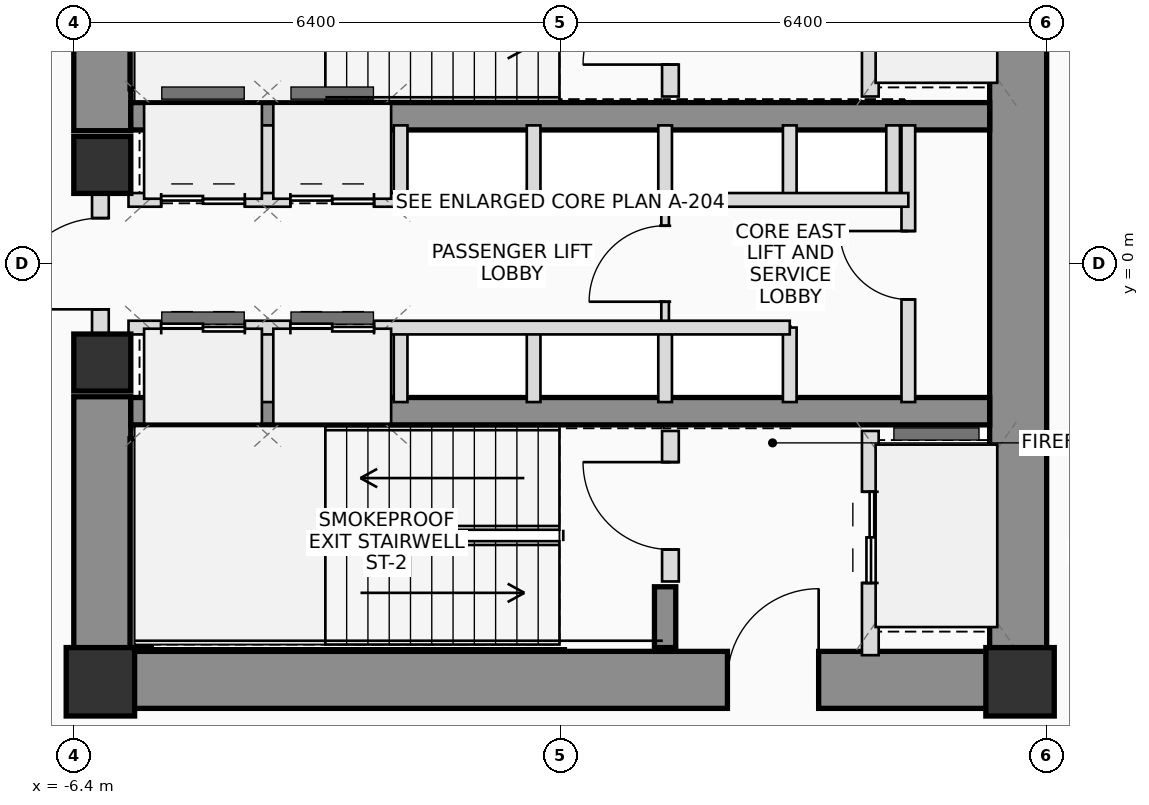
"""IFC4 building model, lengths in metres.
Left out: names, types, materials, properties, quantities, classifications, styles, units other than length and angle.
Written with IfcOpenShell. Run it as: python <this file> out.ifc"""

import sys

from ifc_helpers import new_model, si_unit, direction, frame, frame_2d, origin, origin_2d, place, context, subcontext, project, spatial, rectangle, extrude, source, transform, mapped, element, fill, save


model = new_model("IFC4")
c1 = context("Model", 3, precision=1e-05, world=origin(), true_north=direction((0.0, 1.0)))
c2 = subcontext(c1, "Body", "Model", "MODEL_VIEW")
j1 = project(units=[si_unit("LENGTHUNIT", "METRE"), si_unit("PLANEANGLEUNIT", "RADIAN")], contexts=[c1])
p1 = place(None, origin())
s1 = spatial("IfcSite", under=j1, at=p1, CompositionType="ELEMENT")
p2 = place(p1, origin())
s2 = spatial("IfcBuilding", under=s1, at=p2, CompositionType="ELEMENT")
p3 = place(p2, frame((0.0, 0.0, 38.6)))
s3 = spatial("IfcBuildingStorey", under=s2, at=p3, CompositionType="ELEMENT", Elevation=38.6)
m1 = source(origin(), c2, "Body", "SweptSolid", [
    extrude(rectangle(XDim=0.9, YDim=0.9, at=origin_2d()), origin(), (0.0, 0.0, 1.0), 3.7),
])
for number, where, z_axis, x_axis in (
    (1, (-6.05, -5.5, 0.0), (0.0, 0.0, 1.0), (1.0, 0.0, 0.0)),
    (2, (6.05, -5.5, 0.0), (0.0, 0.0, 1.0), (1.0, 0.0, 0.0)),
):
    element("IfcColumn", number, at=place(p3, frame(where, z_axis=z_axis, x_axis=x_axis)), inside=s3, PredefinedType="COLUMN", context=c2, shape_type="MappedRepresentation", body=[
        mapped(m1, transform((0.0, 0.0, 0.0), scale=1.0)),
    ])
p4 = place(p3, frame((-6.4, -5.475, 0.0), z_axis=(0.0, 0.0, 1.0), x_axis=(1.0, 0.0, 0.0)))
e3 = element("IfcWall", 3, at=p4, inside=s3, PredefinedType="SHEAR", context=c2, shape_type="SweptSolid", body=[
    extrude(rectangle(XDim=12.8, YDim=0.75, at=frame_2d((6.4, 0.0))), origin(), (0.0, 0.0, 1.0), 3.7),
])
p5 = place(p4, frame((8.6, 0.0, 0.0)))
e4 = element("IfcOpeningElement", 4, at=p5, cuts=e3, PredefinedType="OPENING", context=c2, shape_type="SweptSolid", body=[
    extrude(rectangle(XDim=1.2, YDim=2.2, at=frame_2d((0.6, 1.1))), frame((0.0, 0.385, 0.0), z_axis=(0.0, -1.0, 0.0), x_axis=(1.0, 0.0, 0.0)), (0.0, 0.0, 1.0), 0.77),
])
p6 = place(p3, frame((6.025, -5.1, 0.0), z_axis=(0.0, 0.0, 1.0), x_axis=(0.0, 1.0, 0.0)))
e5 = element("IfcWall", 5, at=p6, inside=s3, PredefinedType="SHEAR", context=c2, shape_type="SweptSolid", body=[
    extrude(rectangle(XDim=10.2, YDim=0.75, at=frame_2d((5.1, 0.0))), origin(), (0.0, 0.0, 1.0), 3.7),
])
for number, where, z_axis, x_axis in (
    (6, (-6.025, -5.1, 0.0), (0.0, 0.0, 1.0), (0.0, 1.0, 0.0)),
    (7, (-6.025, 1.75, 0.0), (0.0, 0.0, 1.0), (0.0, 1.0, 0.0)),
):
    element("IfcWall", number, at=place(p3, frame(where, z_axis=z_axis, x_axis=x_axis)), inside=s3, PredefinedType="SHEAR", context=c2, shape_type="SweptSolid", body=[
        extrude(rectangle(XDim=3.35, YDim=0.75, at=frame_2d((1.675, 0.0))), origin(), (0.0, 0.0, 1.0), 3.7),
    ])
for number, where, z_axis, x_axis in (
    (8, (-5.65, 1.94, 0.0), (0.0, 0.0, 1.0), (1.0, 0.0, 0.0)),
    (9, (-5.65, -1.94, 0.0), (0.0, 0.0, 1.0), (1.0, 0.0, 0.0)),
):
    element("IfcWall", number, at=place(p3, frame(where, z_axis=z_axis, x_axis=x_axis)), inside=s3, PredefinedType="SHEAR", context=c2, shape_type="SweptSolid", body=[
        extrude(rectangle(XDim=11.3, YDim=0.36, at=frame_2d((5.65, 0.0))), origin(), (0.0, 0.0, 1.0), 3.7),
    ])
for number, where, z_axis, x_axis in (
    (10, (-5.52, 2.3, 0.0), (0.0, 0.0, 1.0), (0.0, 1.0, 0.0)),
    (11, (-5.52, -5.05, 0.0), (0.0, 0.0, 1.0), (0.0, 1.0, 0.0)),
):
    element("IfcWall", number, at=place(p3, frame(where, z_axis=z_axis, x_axis=x_axis)), inside=s3, PredefinedType="SHEAR", context=c2, shape_type="SweptSolid", body=[
        extrude(rectangle(XDim=2.75, YDim=0.28, at=frame_2d((1.375, 0.0))), origin(), (0.0, 0.0, 1.0), 3.7),
    ])
p7 = place(p3, frame((1.38, -5.05, 0.0), z_axis=(0.0, 0.0, 1.0), x_axis=(0.0, 1.0, 0.0)))
e12 = element("IfcWall", 12, at=p7, inside=s3, PredefinedType="SHEAR", context=c2, shape_type="SweptSolid", body=[
    extrude(rectangle(XDim=0.8, YDim=0.28, at=frame_2d((0.4, 0.0))), origin(), (0.0, 0.0, 1.0), 3.7),
])
m2 = source(origin(), c2, "Body", "SweptSolid", [
    extrude(rectangle(XDim=0.75, YDim=0.75, at=origin_2d()), origin(), (0.0, 0.0, 1.0), 3.7),
])
for number, where, z_axis, x_axis in (
    (13, (-6.025, -1.3, 0.0), (0.0, 0.0, 1.0), (1.0, 0.0, 0.0)),
    (14, (-6.025, 1.3, 0.0), (0.0, 0.0, 1.0), (1.0, 0.0, 0.0)),
):
    element("IfcColumn", number, at=place(p3, frame(where, z_axis=z_axis, x_axis=x_axis)), inside=s3, PredefinedType="COLUMN", context=c2, shape_type="MappedRepresentation", body=[
        mapped(m2, transform((0.0, 0.0, 0.0), scale=1.0)),
    ])
p8 = place(p3, frame((-6.05, -0.95, 0.0), z_axis=(0.0, 0.0, 1.0), x_axis=(0.0, 1.0, 0.0)))
e15 = element("IfcWall", 15, at=p8, inside=s3, PredefinedType="PLUMBINGWALL", context=c2, shape_type="SweptSolid", body=[
    extrude(rectangle(XDim=1.9, YDim=0.22, at=frame_2d((0.95, 0.0))), origin(), (0.0, 0.0, 1.0), 2.475),
])
p9 = place(p8, frame((0.35, 0.0, 0.0)))
e16 = element("IfcOpeningElement", 16, at=p9, cuts=e15, PredefinedType="OPENING", context=c2, shape_type="SweptSolid", body=[
    extrude(rectangle(XDim=1.2, YDim=2.2, at=frame_2d((0.6, 1.1))), frame((0.0, 0.12, 0.0), z_axis=(0.0, -1.0, 0.0), x_axis=(1.0, 0.0, 0.0)), (0.0, 0.0, 1.0), 0.24),
])
p10 = place(p3, frame((1.45, 2.2, 0.0), z_axis=(0.0, 0.0, 1.0), x_axis=(0.0, 1.0, 0.0)))
e17 = element("IfcWall", 17, at=p10, inside=s3, PredefinedType="PLUMBINGWALL", context=c2, shape_type="SweptSolid", body=[
    extrude(rectangle(XDim=1.98, YDim=0.22, at=frame_2d((0.99, 0.0))), origin(), (0.0, 0.0, 1.0), 3.495),
])
p11 = place(p10, frame((0.42, 0.0, 0.0)))
e18 = element("IfcOpeningElement", 18, at=p11, cuts=e17, PredefinedType="OPENING", context=c2, shape_type="SweptSolid", body=[
    extrude(rectangle(XDim=1.15, YDim=2.15, at=frame_2d((0.575, 1.075))), frame((0.0, 0.12, 0.0), z_axis=(0.0, -1.0, 0.0), x_axis=(1.0, 0.0, 0.0)), (0.0, 0.0, 1.0), 0.24),
])
p12 = place(p3, frame((4.08, 2.2, 0.0), z_axis=(0.0, 0.0, 1.0), x_axis=(0.0, 1.0, 0.0)))
e19 = element("IfcWall", 19, at=p12, inside=s3, PredefinedType="PLUMBINGWALL", context=c2, shape_type="SweptSolid", body=[
    extrude(rectangle(XDim=2.95, YDim=0.22, at=frame_2d((1.475, 0.0))), origin(), (0.0, 0.0, 1.0), 3.495),
])
p13 = place(p12, frame((0.75, 0.0, 0.0)))
e20 = element("IfcOpeningElement", 20, at=p13, cuts=e19, PredefinedType="OPENING", context=c2, shape_type="SweptSolid", body=[
    extrude(rectangle(XDim=1.2, YDim=2.25, at=frame_2d((0.6, 1.125))), frame((0.0, 0.12, 0.0), z_axis=(0.0, -1.0, 0.0), x_axis=(1.0, 0.0, 0.0)), (0.0, 0.0, 1.0), 0.24),
])
p14 = place(p3, frame((1.45, -4.18, 0.0), z_axis=(0.0, 0.0, 1.0), x_axis=(0.0, 1.0, 0.0)))
e21 = element("IfcWall", 21, at=p14, inside=s3, PredefinedType="PLUMBINGWALL", context=c2, shape_type="SweptSolid", body=[
    extrude(rectangle(XDim=1.98, YDim=0.22, at=frame_2d((0.99, 0.0))), origin(), (0.0, 0.0, 1.0), 3.495),
])
p15 = place(p14, frame((0.42, 0.0, 0.0)))
e22 = element("IfcOpeningElement", 22, at=p15, cuts=e21, PredefinedType="OPENING", context=c2, shape_type="SweptSolid", body=[
    extrude(rectangle(XDim=1.15, YDim=2.15, at=frame_2d((0.575, 1.075))), frame((0.0, 0.12, 0.0), z_axis=(0.0, -1.0, 0.0), x_axis=(1.0, 0.0, 0.0)), (0.0, 0.0, 1.0), 0.24),
])
p16 = place(p3, frame((4.08, -5.15, 0.0), z_axis=(0.0, 0.0, 1.0), x_axis=(0.0, 1.0, 0.0)))
e23 = element("IfcWall", 23, at=p16, inside=s3, PredefinedType="PLUMBINGWALL", context=c2, shape_type="SweptSolid", body=[
    extrude(rectangle(XDim=2.95, YDim=0.22, at=frame_2d((1.475, 0.0))), origin(), (0.0, 0.0, 1.0), 3.495),
])
p17 = place(p16, frame((0.95, 0.0, 0.0)))
e24 = element("IfcOpeningElement", 24, at=p17, cuts=e23, PredefinedType="OPENING", context=c2, shape_type="SweptSolid", body=[
    extrude(rectangle(XDim=1.2, YDim=2.25, at=frame_2d((0.6, 1.125))), frame((0.0, 0.12, 0.0), z_axis=(0.0, -1.0, 0.0), x_axis=(1.0, 0.0, 0.0)), (0.0, 0.0, 1.0), 0.24),
])
p18 = place(p3, frame((1.38, -0.84, 0.0), z_axis=(0.0, 0.0, 1.0), x_axis=(0.0, 1.0, 0.0)))
e25 = element("IfcWall", 25, at=p18, inside=s3, PredefinedType="PARTITIONING", context=c2, shape_type="SweptSolid", body=[
    extrude(rectangle(XDim=1.68, YDim=0.1, at=frame_2d((0.84, 0.0))), origin(), (0.0, 0.0, 1.0), 3.495),
])
p19 = place(p18, frame((0.34, 0.0, 0.0)))
e26 = element("IfcOpeningElement", 26, at=p19, cuts=e25, PredefinedType="OPENING", context=c2, shape_type="SweptSolid", body=[
    extrude(rectangle(XDim=1.0, YDim=2.25, at=frame_2d((0.5, 1.125))), frame((0.0, 0.06, 0.0), z_axis=(0.0, -1.0, 0.0), x_axis=(1.0, 0.0, 0.0)), (0.0, 0.0, 1.0), 0.12),
])
for number, where, z_axis, x_axis in (
    (27, (-3.85, 0.84, 0.0), (0.0, 0.0, 1.0), (0.0, 1.0, 0.0)),
    (28, (-3.85, -1.82, 0.0), (0.0, 0.0, 1.0), (0.0, 1.0, 0.0)),
    (29, (-2.1, 0.84, 0.0), (0.0, 0.0, 1.0), (0.0, 1.0, 0.0)),
    (30, (-2.1, -1.82, 0.0), (0.0, 0.0, 1.0), (0.0, 1.0, 0.0)),
    (31, (-0.35, 0.84, 0.0), (0.0, 0.0, 1.0), (0.0, 1.0, 0.0)),
    (32, (-0.35, -1.82, 0.0), (0.0, 0.0, 1.0), (0.0, 1.0, 0.0)),
    (33, (1.38, 0.84, 0.0), (0.0, 0.0, 1.0), (0.0, 1.0, 0.0)),
    (34, (1.38, -1.82, 0.0), (0.0, 0.0, 1.0), (0.0, 1.0, 0.0)),
    (35, (3.02, 0.84, 0.0), (0.0, 0.0, 1.0), (0.0, 1.0, 0.0)),
    (36, (4.38, 0.84, 0.0), (0.0, 0.0, 1.0), (0.0, 1.0, 0.0)),
    (37, (3.02, -1.82, 0.0), (0.0, 0.0, 1.0), (0.0, 1.0, 0.0)),
):
    element("IfcWall", number, at=place(p3, frame(where, z_axis=z_axis, x_axis=x_axis)), inside=s3, PredefinedType="PLUMBINGWALL", context=c2, shape_type="SweptSolid", body=[
        extrude(rectangle(XDim=0.98, YDim=0.18, at=frame_2d((0.49, 0.0))), origin(), (0.0, 0.0, 1.0), 3.495),
    ])
p20 = place(p3, frame((4.58, -1.82, 0.0), z_axis=(0.0, 0.0, 1.0), x_axis=(0.0, 1.0, 0.0)))
e38 = element("IfcWall", 38, at=p20, inside=s3, PredefinedType="PLUMBINGWALL", context=c2, shape_type="SweptSolid", body=[
    extrude(rectangle(XDim=3.64, YDim=0.18, at=frame_2d((1.82, 0.0))), origin(), (0.0, 0.0, 1.0), 3.495),
])
p21 = place(p20, frame((1.35, 0.0, 0.0)))
e39 = element("IfcOpeningElement", 39, at=p21, cuts=e38, PredefinedType="OPENING", context=c2, shape_type="SweptSolid", body=[
    extrude(rectangle(XDim=0.9, YDim=2.05, at=frame_2d((0.45, 1.025))), frame((0.0, 0.1, 0.0), z_axis=(0.0, -1.0, 0.0), x_axis=(1.0, 0.0, 0.0)), (0.0, 0.0, 1.0), 0.2),
])
p22 = place(p3, frame((-5.68, 0.84, 0.0), z_axis=(0.0, 0.0, 1.0), x_axis=(1.0, 0.0, 0.0)))
e40 = element("IfcWall", 40, at=p22, inside=s3, PredefinedType="PLUMBINGWALL", context=c2, shape_type="SweptSolid", body=[
    extrude(rectangle(XDim=10.26, YDim=0.18, at=frame_2d((5.13, 0.0))), origin(), (0.0, 0.0, 1.0), 3.495),
])
p23 = place(p22, frame((0.43, 0.0, 0.0)))
e41 = element("IfcOpeningElement", 41, at=p23, cuts=e40, PredefinedType="OPENING", context=c2, shape_type="SweptSolid", body=[
    extrude(rectangle(XDim=1.1, YDim=2.2, at=frame_2d((0.55, 1.1))), frame((0.0, 0.1, 0.0), z_axis=(0.0, -1.0, 0.0), x_axis=(1.0, 0.0, 0.0)), (0.0, 0.0, 1.0), 0.2),
])
p24 = place(p22, frame((2.13, 0.0, 0.0)))
e42 = element("IfcOpeningElement", 42, at=p24, cuts=e40, PredefinedType="OPENING", context=c2, shape_type="SweptSolid", body=[
    extrude(rectangle(XDim=1.1, YDim=2.2, at=frame_2d((0.55, 1.1))), frame((0.0, 0.1, 0.0), z_axis=(0.0, -1.0, 0.0), x_axis=(1.0, 0.0, 0.0)), (0.0, 0.0, 1.0), 0.2),
])
p25 = place(p3, frame((-5.68, -0.84, 0.0), z_axis=(0.0, 0.0, 1.0), x_axis=(1.0, 0.0, 0.0)))
e43 = element("IfcWall", 43, at=p25, inside=s3, PredefinedType="PLUMBINGWALL", context=c2, shape_type="SweptSolid", body=[
    extrude(rectangle(XDim=8.7, YDim=0.18, at=frame_2d((4.35, 0.0))), origin(), (0.0, 0.0, 1.0), 3.495),
])
p26 = place(p25, frame((0.43, 0.0, 0.0)))
e44 = element("IfcOpeningElement", 44, at=p26, cuts=e43, PredefinedType="OPENING", context=c2, shape_type="SweptSolid", body=[
    extrude(rectangle(XDim=1.1, YDim=2.2, at=frame_2d((0.55, 1.1))), frame((0.0, 0.1, 0.0), z_axis=(0.0, -1.0, 0.0), x_axis=(1.0, 0.0, 0.0)), (0.0, 0.0, 1.0), 0.2),
])
p27 = place(p25, frame((2.13, 0.0, 0.0)))
e45 = element("IfcOpeningElement", 45, at=p27, cuts=e43, PredefinedType="OPENING", context=c2, shape_type="SweptSolid", body=[
    extrude(rectangle(XDim=1.1, YDim=2.2, at=frame_2d((0.55, 1.1))), frame((0.0, 0.1, 0.0), z_axis=(0.0, -1.0, 0.0), x_axis=(1.0, 0.0, 0.0)), (0.0, 0.0, 1.0), 0.2),
])
p28 = place(p5, origin())
e46 = element("IfcDoor", 46, at=p28, inside=s3, OperationType="SINGLE_SWING_RIGHT", PredefinedType="DOOR", context=c2, shape_type="SweptSolid", body=[
    extrude(rectangle(XDim=1.2, YDim=2.2, at=frame_2d((0.6, 1.1))), frame((0.0, 0.025, 0.0), z_axis=(0.0, -1.0, 0.0), x_axis=(1.0, 0.0, 0.0)), (0.0, 0.0, 1.0), 0.05),
])
fill(e4, e46)
p29 = place(p9, origin())
e47 = element("IfcDoor", 47, at=p29, inside=s3, OperationType="SINGLE_SWING_LEFT", PredefinedType="DOOR", context=c2, shape_type="SweptSolid", body=[
    extrude(rectangle(XDim=1.2, YDim=2.2, at=frame_2d((0.6, 1.1))), frame((0.0, 0.025, 0.0), z_axis=(0.0, -1.0, 0.0), x_axis=(1.0, 0.0, 0.0)), (0.0, 0.0, 1.0), 0.05),
])
fill(e16, e47)
p30 = place(p11, origin())
e48 = element("IfcDoor", 48, at=p30, inside=s3, OperationType="SINGLE_SWING_LEFT", PredefinedType="DOOR", context=c2, shape_type="SweptSolid", body=[
    extrude(rectangle(XDim=1.15, YDim=2.15, at=frame_2d((0.575, 1.075))), frame((0.0, 0.025, 0.0), z_axis=(0.0, -1.0, 0.0), x_axis=(1.0, 0.0, 0.0)), (0.0, 0.0, 1.0), 0.05),
])
fill(e18, e48)
p31 = place(p15, origin())
e49 = element("IfcDoor", 49, at=p31, inside=s3, OperationType="SINGLE_SWING_RIGHT", PredefinedType="DOOR", context=c2, shape_type="SweptSolid", body=[
    extrude(rectangle(XDim=1.15, YDim=2.15, at=frame_2d((0.575, 1.075))), frame((0.0, 0.025, 0.0), z_axis=(0.0, -1.0, 0.0), x_axis=(1.0, 0.0, 0.0)), (0.0, 0.0, 1.0), 0.05),
])
fill(e22, e49)
p32 = place(p17, origin())
e50 = element("IfcDoor", 50, at=p32, inside=s3, OperationType="DOUBLE_DOOR_SLIDING", PredefinedType="DOOR", context=c2, shape_type="SweptSolid", body=[
    extrude(rectangle(XDim=1.2, YDim=2.25, at=frame_2d((0.6, 1.125))), frame((0.0, 0.025, 0.0), z_axis=(0.0, -1.0, 0.0), x_axis=(1.0, 0.0, 0.0)), (0.0, 0.0, 1.0), 0.05),
])
fill(e24, e50)
p33 = place(p19, origin())
e51 = element("IfcDoor", 51, at=p33, inside=s3, OperationType="SINGLE_SWING_LEFT", PredefinedType="DOOR", context=c2, shape_type="SweptSolid", body=[
    extrude(rectangle(XDim=1.0, YDim=2.25, at=frame_2d((0.5, 1.125))), frame((0.0, 0.025, 0.0), z_axis=(0.0, -1.0, 0.0), x_axis=(1.0, 0.0, 0.0)), (0.0, 0.0, 1.0), 0.05),
])
fill(e26, e51)
p34 = place(p21, origin())
e52 = element("IfcDoor", 52, at=p34, inside=s3, OperationType="SINGLE_SWING_RIGHT", PredefinedType="DOOR", context=c2, shape_type="SweptSolid", body=[
    extrude(rectangle(XDim=0.9, YDim=2.05, at=frame_2d((0.45, 1.025))), frame((0.0, 0.025, 0.0), z_axis=(0.0, -1.0, 0.0), x_axis=(1.0, 0.0, 0.0)), (0.0, 0.0, 1.0), 0.05),
])
fill(e39, e52)
p35 = place(p23, origin())
e53 = element("IfcDoor", 53, at=p35, inside=s3, OperationType="DOUBLE_DOOR_SLIDING", PredefinedType="DOOR", context=c2, shape_type="SweptSolid", body=[
    extrude(rectangle(XDim=1.1, YDim=2.2, at=frame_2d((0.55, 1.1))), frame((0.0, 0.025, 0.0), z_axis=(0.0, -1.0, 0.0), x_axis=(1.0, 0.0, 0.0)), (0.0, 0.0, 1.0), 0.05),
])
fill(e41, e53)
p36 = place(p24, origin())
e54 = element("IfcDoor", 54, at=p36, inside=s3, OperationType="DOUBLE_DOOR_SLIDING", PredefinedType="DOOR", context=c2, shape_type="SweptSolid", body=[
    extrude(rectangle(XDim=1.1, YDim=2.2, at=frame_2d((0.55, 1.1))), frame((0.0, 0.025, 0.0), z_axis=(0.0, -1.0, 0.0), x_axis=(1.0, 0.0, 0.0)), (0.0, 0.0, 1.0), 0.05),
])
fill(e42, e54)
p37 = place(p26, origin())
e55 = element("IfcDoor", 55, at=p37, inside=s3, OperationType="DOUBLE_DOOR_SLIDING", PredefinedType="DOOR", context=c2, shape_type="SweptSolid", body=[
    extrude(rectangle(XDim=1.1, YDim=2.2, at=frame_2d((0.55, 1.1))), frame((0.0, 0.025, 0.0), z_axis=(0.0, -1.0, 0.0), x_axis=(1.0, 0.0, 0.0)), (0.0, 0.0, 1.0), 0.05),
])
fill(e44, e55)
p38 = place(p27, origin())
e56 = element("IfcDoor", 56, at=p38, inside=s3, OperationType="DOUBLE_DOOR_SLIDING", PredefinedType="DOOR", context=c2, shape_type="SweptSolid", body=[
    extrude(rectangle(XDim=1.1, YDim=2.2, at=frame_2d((0.55, 1.1))), frame((0.0, 0.025, 0.0), z_axis=(0.0, -1.0, 0.0), x_axis=(1.0, 0.0, 0.0)), (0.0, 0.0, 1.0), 0.05),
])
fill(e45, e56)
save(model, sys.argv[1])
